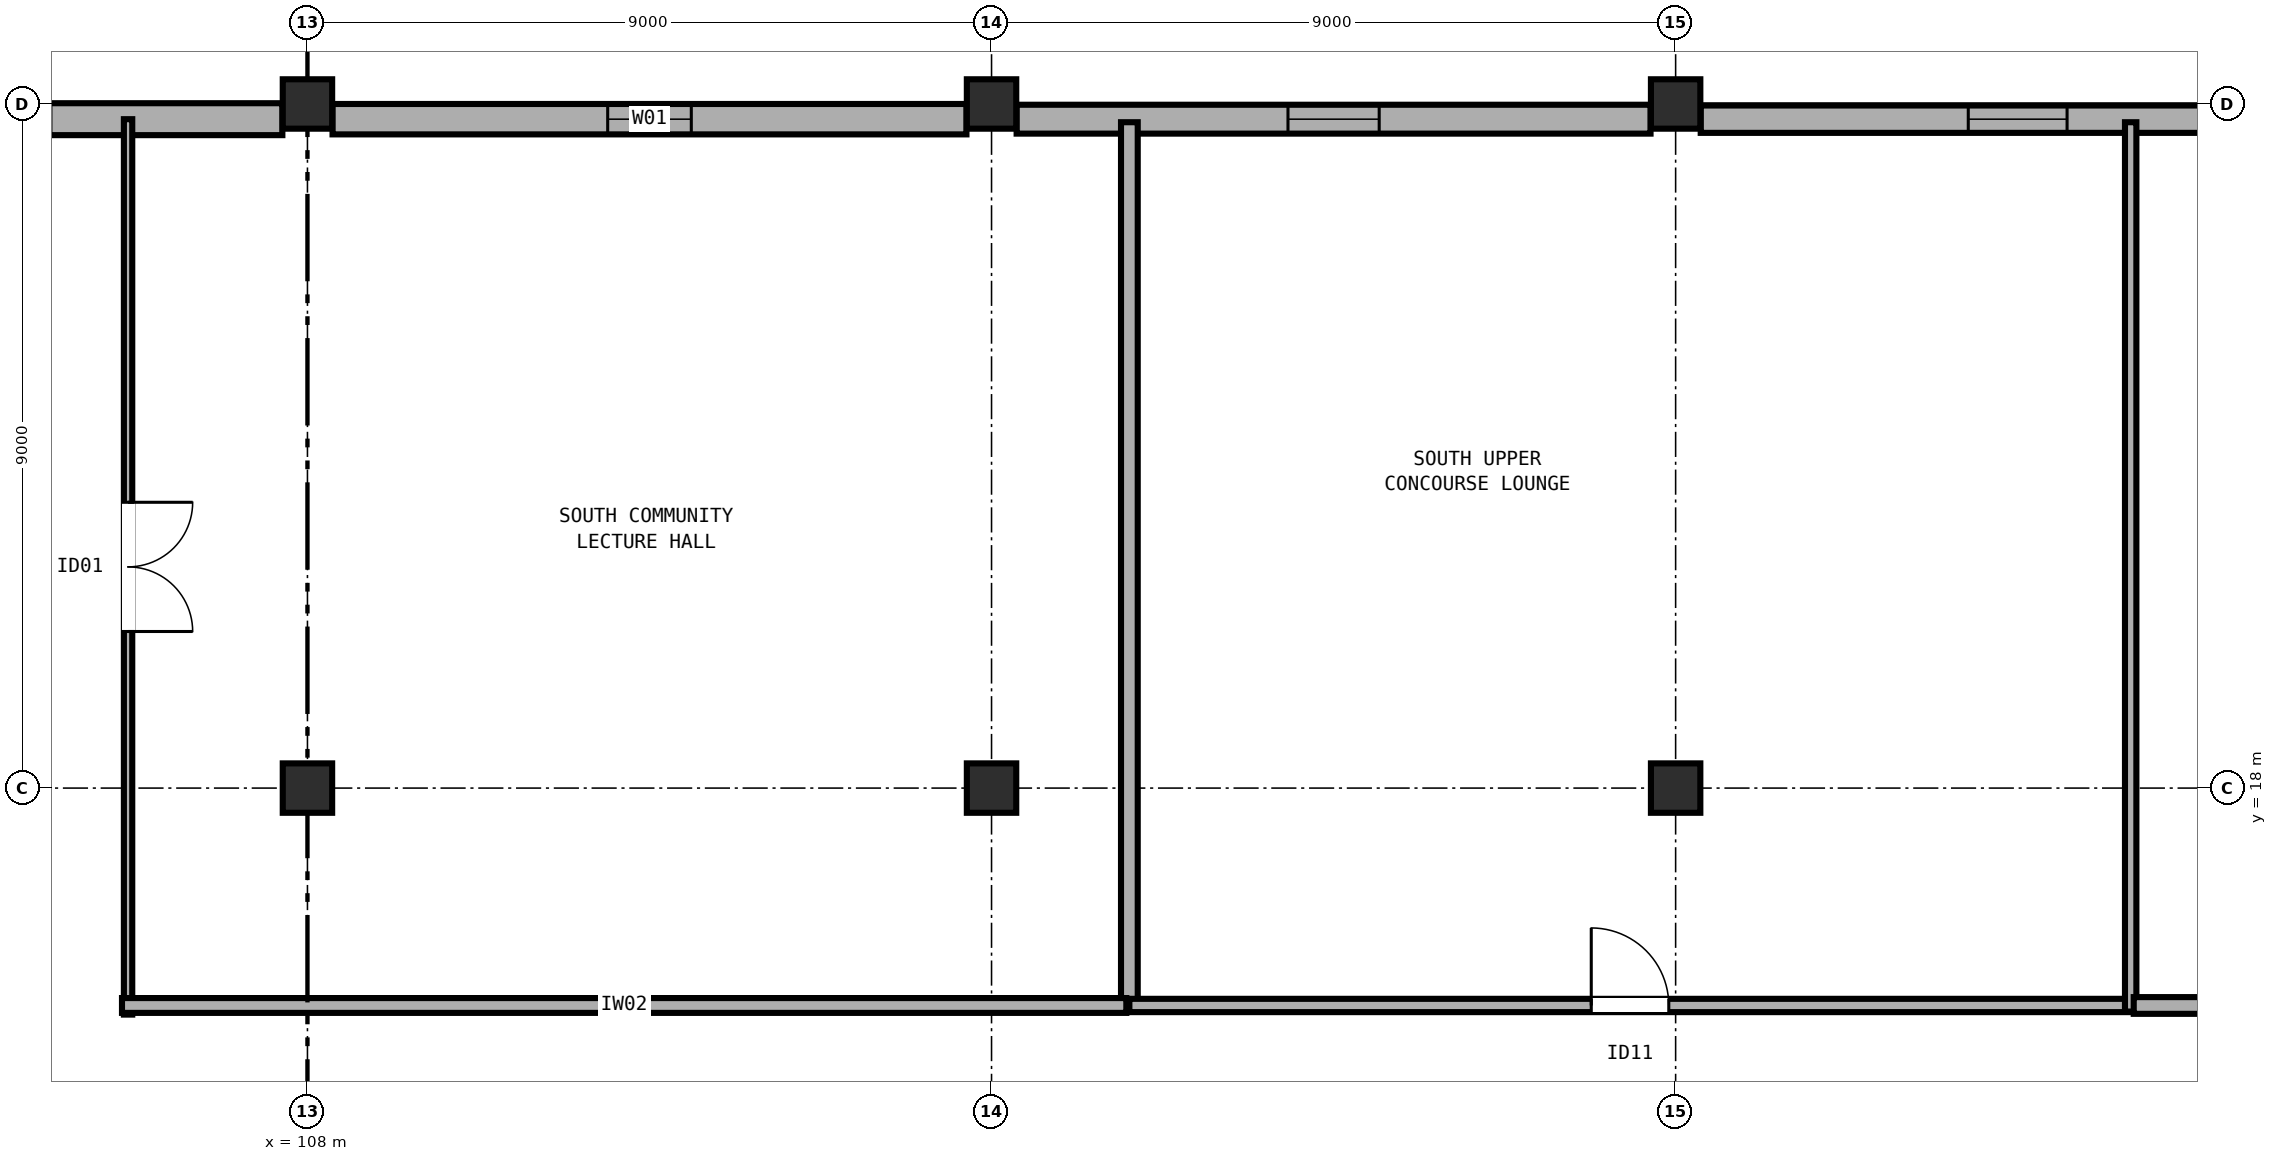
"""IFC4 building model, lengths in metres.
Left out: names, types, materials, properties, quantities, classifications, styles, units other than length and angle.
Written with IfcOpenShell. Run it as: python <this file> out.ifc"""

import sys

from ifc_helpers import new_model, si_unit, direction, frame, frame_2d, origin, origin_2d, place, context, subcontext, project, spatial, rectangle, extrude, element, fill, save


model = new_model("IFC4")
c1 = context("Model", 3, precision=1e-05, world=origin(), true_north=direction((0.0, 1.0)))
c2 = subcontext(c1, "Body", "Model", "MODEL_VIEW")
j1 = project(units=[si_unit("LENGTHUNIT", "METRE"), si_unit("PLANEANGLEUNIT", "RADIAN")], contexts=[c1])
p1 = place(None, origin())
s1 = spatial("IfcSite", under=j1, at=p1, CompositionType="ELEMENT")
p2 = place(p1, origin())
s2 = spatial("IfcBuilding", under=s1, at=p2, CompositionType="ELEMENT")
p3 = place(p2, frame((0.0, 0.0, 14.4)))
s3 = spatial("IfcBuildingStorey", under=s2, at=p3, CompositionType="ELEMENT", Elevation=14.4)
for number, where, z_axis, x_axis in (
    (1, (108.0, 18.0, 0.0), (0.0, 0.0, 1.0), (1.0, 0.0, 0.0)),
    (2, (108.0, 27.0, 0.0), (0.0, 0.0, 1.0), (1.0, 0.0, 0.0)),
    (3, (117.0, 18.0, 0.0), (0.0, 0.0, 1.0), (1.0, 0.0, 0.0)),
    (4, (117.0, 27.0, 0.0), (0.0, 0.0, 1.0), (1.0, 0.0, 0.0)),
    (5, (126.0, 18.0, 0.0), (0.0, 0.0, 1.0), (1.0, 0.0, 0.0)),
    (6, (126.0, 27.0, 0.0), (0.0, 0.0, 1.0), (1.0, 0.0, 0.0)),
):
    element("IfcColumn", number, at=place(p3, frame(where, z_axis=z_axis, x_axis=x_axis)), inside=s3, PredefinedType="COLUMN", context=c2, shape_type="SweptSolid", body=[
        extrude(rectangle(XDim=0.65, YDim=0.65, at=origin_2d()), origin(), (0.0, 0.0, 1.0), 4.8),
    ])
p4 = place(p3, frame((99.33, 26.8, 0.0), z_axis=(0.0, 0.0, 1.0), x_axis=(1.0, 0.0, 0.0)))
e7 = element("IfcWall", 7, at=p4, inside=s3, PredefinedType="SOLIDWALL", context=c2, shape_type="SweptSolid", body=[
    extrude(rectangle(XDim=8.34, YDim=0.42, at=frame_2d((4.17, 0.0))), origin(), (0.0, 0.0, 1.0), 3.58),
])
p5 = place(p4, frame((3.045, 0.0, 0.9)))
e8 = element("IfcOpeningElement", 8, at=p5, cuts=e7, PredefinedType="OPENING", context=c2, shape_type="SweptSolid", body=[
    extrude(rectangle(XDim=2.25, YDim=2.05, at=frame_2d((1.125, 1.025))), frame((0.0, 0.22, 0.0), z_axis=(0.0, -1.0, 0.0), x_axis=(1.0, 0.0, 0.0)), (0.0, 0.0, 1.0), 0.44),
])
p6 = place(p3, frame((108.33, 26.8, 0.0), z_axis=(0.0, 0.0, 1.0), x_axis=(1.0, 0.0, 0.0)))
e9 = element("IfcWall", 9, at=p6, inside=s3, PredefinedType="SOLIDWALL", context=c2, shape_type="SweptSolid", body=[
    extrude(rectangle(XDim=8.34, YDim=0.4, at=frame_2d((4.17, 0.0))), origin(), (0.0, 0.0, 1.0), 3.58),
])
p7 = place(p6, frame((3.62, 0.0, 0.9)))
e10 = element("IfcOpeningElement", 10, at=p7, cuts=e9, PredefinedType="OPENING", context=c2, shape_type="SweptSolid", body=[
    extrude(rectangle(XDim=1.1, YDim=1.4, at=frame_2d((0.55, 0.7))), frame((0.0, 0.21, 0.0), z_axis=(0.0, -1.0, 0.0), x_axis=(1.0, 0.0, 0.0)), (0.0, 0.0, 1.0), 0.42),
])
p8 = place(p3, frame((117.33, 26.8, 0.0), z_axis=(0.0, 0.0, 1.0), x_axis=(1.0, 0.0, 0.0)))
e11 = element("IfcWall", 11, at=p8, inside=s3, PredefinedType="SOLIDWALL", context=c2, shape_type="SweptSolid", body=[
    extrude(rectangle(XDim=8.34, YDim=0.38, at=frame_2d((4.17, 0.0))), origin(), (0.0, 0.0, 1.0), 3.58),
])
p9 = place(p8, frame((3.57, 0.0, 0.9)))
e12 = element("IfcOpeningElement", 12, at=p9, cuts=e11, PredefinedType="OPENING", context=c2, shape_type="SweptSolid", body=[
    extrude(rectangle(XDim=1.2, YDim=1.45, at=frame_2d((0.6, 0.725))), frame((0.0, 0.2, 0.0), z_axis=(0.0, -1.0, 0.0), x_axis=(1.0, 0.0, 0.0)), (0.0, 0.0, 1.0), 0.4),
])
p10 = place(p3, frame((126.33, 26.8, 0.0), z_axis=(0.0, 0.0, 1.0), x_axis=(1.0, 0.0, 0.0)))
e13 = element("IfcWall", 13, at=p10, inside=s3, PredefinedType="SOLIDWALL", context=c2, shape_type="SweptSolid", body=[
    extrude(rectangle(XDim=8.34, YDim=0.36, at=frame_2d((4.17, 0.0))), origin(), (0.0, 0.0, 1.0), 3.58),
])
p11 = place(p10, frame((3.52, 0.0, 0.9)))
e14 = element("IfcOpeningElement", 14, at=p11, cuts=e13, PredefinedType="OPENING", context=c2, shape_type="SweptSolid", body=[
    extrude(rectangle(XDim=1.3, YDim=1.5, at=frame_2d((0.65, 0.75))), frame((0.0, 0.19, 0.0), z_axis=(0.0, -1.0, 0.0), x_axis=(1.0, 0.0, 0.0)), (0.0, 0.0, 1.0), 0.38),
])
p12 = place(p3, frame((105.64, 26.8, 0.0), z_axis=(0.0, 0.0, 1.0), x_axis=(0.0, -1.0, 0.0)))
e15 = element("IfcWall", 15, at=p12, inside=s3, PredefinedType="PARTITIONING", context=c2, shape_type="SweptSolid", body=[
    extrude(rectangle(XDim=11.78, YDim=0.11, at=frame_2d((5.89, 0.0))), origin(), (0.0, 0.0, 1.0), 3.56),
])
p13 = place(p12, frame((5.04, 0.0, 0.0)))
e16 = element("IfcOpeningElement", 16, at=p13, cuts=e15, PredefinedType="OPENING", context=c2, shape_type="SweptSolid", body=[
    extrude(rectangle(XDim=1.7, YDim=2.2, at=frame_2d((0.85, 1.1))), frame((0.0, 0.065, 0.0), z_axis=(0.0, -1.0, 0.0), x_axis=(1.0, 0.0, 0.0)), (0.0, 0.0, 1.0), 0.13),
])
p14 = place(p3, frame((118.813, 26.76, 0.0), z_axis=(0.0, 0.0, 1.0), x_axis=(0.0, -1.0, 0.0)))
e17 = element("IfcWall", 17, at=p14, inside=s3, PredefinedType="PARTITIONING", context=c2, shape_type="SweptSolid", body=[
    extrude(rectangle(XDim=11.7, YDim=0.22, at=frame_2d((5.85, 0.0))), origin(), (0.0, 0.0, 1.0), 3.56),
])
p15 = place(p3, frame((118.773, 15.14, 0.0), z_axis=(0.0, 0.0, 1.0), x_axis=(-1.0, 0.0, 0.0)))
e18 = element("IfcWall", 18, at=p15, inside=s3, PredefinedType="PARTITIONING", context=c2, shape_type="SweptSolid", body=[
    extrude(rectangle(XDim=13.213, YDim=0.195, at=frame_2d((6.606, 0.0))), origin(), (0.0, 0.0, 1.0), 3.56),
])
p16 = place(p3, frame((118.813, 15.14, 0.0), z_axis=(0.0, 0.0, 1.0), x_axis=(1.0, 0.0, 0.0)))
e19 = element("IfcWall", 19, at=p16, inside=s3, PredefinedType="PARTITIONING", context=c2, shape_type="SweptSolid", body=[
    extrude(rectangle(XDim=13.174, YDim=0.175, at=frame_2d((6.587, 0.0))), origin(), (0.0, 0.0, 1.0), 3.56),
])
p17 = place(p16, frame((6.077, 0.0, 0.0)))
e20 = element("IfcOpeningElement", 20, at=p17, cuts=e19, PredefinedType="OPENING", context=c2, shape_type="SweptSolid", body=[
    extrude(rectangle(XDim=1.02, YDim=2.16, at=frame_2d((0.51, 1.08))), frame((0.0, 0.097, 0.0), z_axis=(0.0, -1.0, 0.0), x_axis=(1.0, 0.0, 0.0)), (0.0, 0.0, 1.0), 0.195),
])
p18 = place(p3, frame((131.987, 26.76, 0.0), z_axis=(0.0, 0.0, 1.0), x_axis=(0.0, -1.0, 0.0)))
e21 = element("IfcWall", 21, at=p18, inside=s3, PredefinedType="PARTITIONING", context=c2, shape_type="SweptSolid", body=[
    extrude(rectangle(XDim=11.7, YDim=0.15, at=frame_2d((5.85, 0.0))), origin(), (0.0, 0.0, 1.0), 3.56),
])
p19 = place(p3, frame((145.24, 15.14, 0.0), z_axis=(0.0, 0.0, 1.0), x_axis=(-1.0, 0.0, 0.0)))
e22 = element("IfcWall", 22, at=p19, inside=s3, PredefinedType="PARTITIONING", context=c2, shape_type="SweptSolid", body=[
    extrude(rectangle(XDim=13.213, YDim=0.22, at=frame_2d((6.607, 0.0))), origin(), (0.0, 0.0, 1.0), 3.56),
])
p20 = place(p7, origin())
e23 = element("IfcWindow", 23, at=p20, inside=s3, PartitioningType="SINGLE_PANEL", PredefinedType="WINDOW", context=c2, shape_type="SweptSolid", body=[
    extrude(rectangle(XDim=1.1, YDim=1.4, at=frame_2d((0.55, 0.7))), frame((0.0, 0.03, 0.0), z_axis=(0.0, -1.0, 0.0), x_axis=(1.0, 0.0, 0.0)), (0.0, 0.0, 1.0), 0.06),
])
fill(e10, e23)
p21 = place(p9, origin())
e24 = element("IfcWindow", 24, at=p21, inside=s3, PartitioningType="SINGLE_PANEL", PredefinedType="WINDOW", context=c2, shape_type="SweptSolid", body=[
    extrude(rectangle(XDim=1.2, YDim=1.45, at=frame_2d((0.6, 0.725))), frame((0.0, 0.03, 0.0), z_axis=(0.0, -1.0, 0.0), x_axis=(1.0, 0.0, 0.0)), (0.0, 0.0, 1.0), 0.06),
])
fill(e12, e24)
p22 = place(p11, origin())
e25 = element("IfcWindow", 25, at=p22, inside=s3, PartitioningType="SINGLE_PANEL", PredefinedType="WINDOW", context=c2, shape_type="SweptSolid", body=[
    extrude(rectangle(XDim=1.3, YDim=1.5, at=frame_2d((0.65, 0.75))), frame((0.0, 0.03, 0.0), z_axis=(0.0, -1.0, 0.0), x_axis=(1.0, 0.0, 0.0)), (0.0, 0.0, 1.0), 0.06),
])
fill(e14, e25)
p23 = place(p13, origin())
e26 = element("IfcDoor", 26, at=p23, inside=s3, OperationType="DOUBLE_DOOR_SINGLE_SWING", PredefinedType="DOOR", context=c2, shape_type="SweptSolid", body=[
    extrude(rectangle(XDim=1.7, YDim=2.2, at=frame_2d((0.85, 1.1))), frame((0.0, 0.025, 0.0), z_axis=(0.0, -1.0, 0.0), x_axis=(1.0, 0.0, 0.0)), (0.0, 0.0, 1.0), 0.05),
])
fill(e16, e26)
p24 = place(p17, origin())
e27 = element("IfcDoor", 27, at=p24, inside=s3, OperationType="SINGLE_SWING_LEFT", PredefinedType="DOOR", context=c2, shape_type="SweptSolid", body=[
    extrude(rectangle(XDim=1.02, YDim=2.16, at=frame_2d((0.51, 1.08))), frame((0.0, 0.025, 0.0), z_axis=(0.0, -1.0, 0.0), x_axis=(1.0, 0.0, 0.0)), (0.0, 0.0, 1.0), 0.05),
])
fill(e20, e27)
save(model, sys.argv[1])
